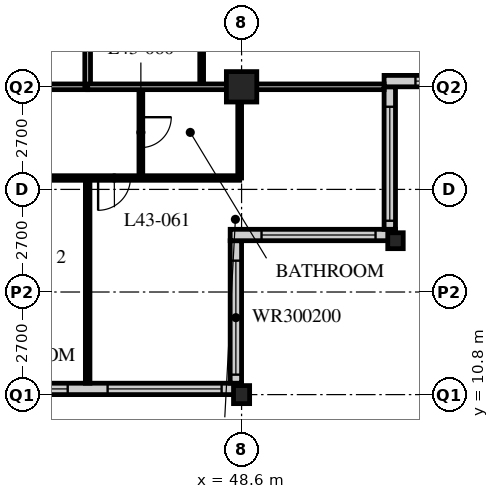
"""IFC4 building model, lengths in metres.
Left out: names, types, materials, properties, quantities, classifications, styles, units other than length and angle.
Written with IfcOpenShell. Run it as: python <this file> out.ifc"""

import sys

from ifc_helpers import new_model, si_unit, direction, frame, frame_2d, origin, origin_2d, place, context, subcontext, project, spatial, rectangle, hollow_rectangle, i_section, extrude, element, fill, save


model = new_model("IFC4")
c1 = context("Model", 3, precision=1e-05, world=origin(), true_north=direction((0.0, 1.0)))
c2 = subcontext(c1, "Body", "Model", "MODEL_VIEW")
j1 = project(units=[si_unit("LENGTHUNIT", "METRE"), si_unit("PLANEANGLEUNIT", "RADIAN")], contexts=[c1])
p1 = place(None, origin())
s1 = spatial("IfcSite", under=j1, at=p1, CompositionType="ELEMENT")
p2 = place(p1, origin())
s2 = spatial("IfcBuilding", under=s1, at=p2, CompositionType="ELEMENT")
p3 = place(p2, frame((0.0, 0.0, 170.4)))
s3 = spatial("IfcBuildingStorey", under=s2, at=p3, CompositionType="ELEMENT", Elevation=170.4)
p4 = place(p3, frame((48.6, 10.8, 0.0), z_axis=(0.0, 0.0, 1.0), x_axis=(1.0, 0.0, 0.0)))
e1 = element("IfcColumn", 1, at=p4, inside=s3, PredefinedType="COLUMN", context=c2, shape_type="SweptSolid", body=[
    extrude(i_section(OverallWidth=0.424, OverallDepth=0.475, WebThickness=0.048, FlangeThickness=0.077, FilletRadius=0.015, at=origin_2d()), origin(), (0.0, 0.0, 1.0), 3.6),
])
p5 = place(p3, frame((48.6, 18.9, 0.0), z_axis=(0.0, 0.0, 1.0), x_axis=(1.0, 0.0, 0.0)))
e2 = element("IfcColumn", 2, at=p5, inside=s3, PredefinedType="COLUMN", context=c2, shape_type="SweptSolid", body=[
    extrude(hollow_rectangle(XDim=0.8, YDim=0.8, WallThickness=0.08, at=origin_2d()), origin(), (0.0, 0.0, 1.0), 3.6),
])
p6 = place(p3, frame((52.65, 14.85, 0.0), z_axis=(0.0, 0.0, 1.0), x_axis=(1.0, 0.0, 0.0)))
e3 = element("IfcColumn", 3, at=p6, inside=s3, PredefinedType="COLUMN", context=c2, shape_type="SweptSolid", body=[
    extrude(i_section(OverallWidth=0.407, OverallDepth=0.419, WebThickness=0.031, FlangeThickness=0.049, FilletRadius=0.015, at=origin_2d()), origin(), (0.0, 0.0, 1.0), 3.6),
])
p7 = place(p3, frame((8.4, 10.95, 0.0), z_axis=(0.0, 0.0, 1.0), x_axis=(1.0, 0.0, 0.0)))
e4 = element("IfcWall", 4, at=p7, inside=s3, PredefinedType="SOLIDWALL", context=c2, shape_type="SweptSolid", body=[
    extrude(rectangle(XDim=40.2, YDim=0.3, at=frame_2d((20.1, 0.0))), origin(), (0.0, 0.0, 1.0), 3.39),
])
p8 = place(p7, frame((0.225, 0.0, 0.6)))
e5 = element("IfcOpeningElement", 5, at=p8, cuts=e4, PredefinedType="OPENING", context=c2, shape_type="SweptSolid", body=[
    extrude(rectangle(XDim=3.0, YDim=2.4, at=frame_2d((1.5, 1.2))), frame((0.0, 0.16, 0.0), z_axis=(0.0, -1.0, 0.0), x_axis=(1.0, 0.0, 0.0)), (0.0, 0.0, 1.0), 0.32),
])
p9 = place(p7, frame((4.275, 0.0, 0.6)))
e6 = element("IfcOpeningElement", 6, at=p9, cuts=e4, PredefinedType="OPENING", context=c2, shape_type="SweptSolid", body=[
    extrude(rectangle(XDim=3.0, YDim=2.4, at=frame_2d((1.5, 1.2))), frame((0.0, 0.16, 0.0), z_axis=(0.0, -1.0, 0.0), x_axis=(1.0, 0.0, 0.0)), (0.0, 0.0, 1.0), 0.32),
])
p10 = place(p7, frame((8.325, 0.0, 0.6)))
e7 = element("IfcOpeningElement", 7, at=p10, cuts=e4, PredefinedType="OPENING", context=c2, shape_type="SweptSolid", body=[
    extrude(rectangle(XDim=3.0, YDim=2.4, at=frame_2d((1.5, 1.2))), frame((0.0, 0.16, 0.0), z_axis=(0.0, -1.0, 0.0), x_axis=(1.0, 0.0, 0.0)), (0.0, 0.0, 1.0), 0.32),
])
p11 = place(p7, frame((12.375, 0.0, 0.6)))
e8 = element("IfcOpeningElement", 8, at=p11, cuts=e4, PredefinedType="OPENING", context=c2, shape_type="SweptSolid", body=[
    extrude(rectangle(XDim=3.0, YDim=2.4, at=frame_2d((1.5, 1.2))), frame((0.0, 0.16, 0.0), z_axis=(0.0, -1.0, 0.0), x_axis=(1.0, 0.0, 0.0)), (0.0, 0.0, 1.0), 0.32),
])
p12 = place(p7, frame((16.425, 0.0, 0.6)))
e9 = element("IfcOpeningElement", 9, at=p12, cuts=e4, PredefinedType="OPENING", context=c2, shape_type="SweptSolid", body=[
    extrude(rectangle(XDim=3.0, YDim=2.4, at=frame_2d((1.5, 1.2))), frame((0.0, 0.16, 0.0), z_axis=(0.0, -1.0, 0.0), x_axis=(1.0, 0.0, 0.0)), (0.0, 0.0, 1.0), 0.32),
])
p13 = place(p7, frame((20.475, 0.0, 0.6)))
e10 = element("IfcOpeningElement", 10, at=p13, cuts=e4, PredefinedType="OPENING", context=c2, shape_type="SweptSolid", body=[
    extrude(rectangle(XDim=3.0, YDim=2.4, at=frame_2d((1.5, 1.2))), frame((0.0, 0.16, 0.0), z_axis=(0.0, -1.0, 0.0), x_axis=(1.0, 0.0, 0.0)), (0.0, 0.0, 1.0), 0.32),
])
p14 = place(p7, frame((24.525, 0.0, 0.6)))
e11 = element("IfcOpeningElement", 11, at=p14, cuts=e4, PredefinedType="OPENING", context=c2, shape_type="SweptSolid", body=[
    extrude(rectangle(XDim=3.0, YDim=2.4, at=frame_2d((1.5, 1.2))), frame((0.0, 0.16, 0.0), z_axis=(0.0, -1.0, 0.0), x_axis=(1.0, 0.0, 0.0)), (0.0, 0.0, 1.0), 0.32),
])
p15 = place(p7, frame((28.575, 0.0, 0.6)))
e12 = element("IfcOpeningElement", 12, at=p15, cuts=e4, PredefinedType="OPENING", context=c2, shape_type="SweptSolid", body=[
    extrude(rectangle(XDim=3.0, YDim=2.4, at=frame_2d((1.5, 1.2))), frame((0.0, 0.16, 0.0), z_axis=(0.0, -1.0, 0.0), x_axis=(1.0, 0.0, 0.0)), (0.0, 0.0, 1.0), 0.32),
])
p16 = place(p7, frame((32.625, 0.0, 0.6)))
e13 = element("IfcOpeningElement", 13, at=p16, cuts=e4, PredefinedType="OPENING", context=c2, shape_type="SweptSolid", body=[
    extrude(rectangle(XDim=3.0, YDim=2.4, at=frame_2d((1.5, 1.2))), frame((0.0, 0.16, 0.0), z_axis=(0.0, -1.0, 0.0), x_axis=(1.0, 0.0, 0.0)), (0.0, 0.0, 1.0), 0.32),
])
p17 = place(p7, frame((36.675, 0.0, 0.6)))
e14 = element("IfcOpeningElement", 14, at=p17, cuts=e4, PredefinedType="OPENING", context=c2, shape_type="SweptSolid", body=[
    extrude(rectangle(XDim=3.0, YDim=2.4, at=frame_2d((1.5, 1.2))), frame((0.0, 0.16, 0.0), z_axis=(0.0, -1.0, 0.0), x_axis=(1.0, 0.0, 0.0)), (0.0, 0.0, 1.0), 0.32),
])
p18 = place(p3, frame((48.45, 11.1, 0.0), z_axis=(0.0, 0.0, 1.0), x_axis=(0.0, 1.0, 0.0)))
e15 = element("IfcWall", 15, at=p18, inside=s3, PredefinedType="SOLIDWALL", context=c2, shape_type="SweptSolid", body=[
    extrude(rectangle(XDim=3.75, YDim=0.3, at=frame_2d((1.875, 0.0))), origin(), (0.0, 0.0, 1.0), 3.39),
])
p19 = place(p18, frame((0.225, 0.0, 0.6)))
e16 = element("IfcOpeningElement", 16, at=p19, cuts=e15, PredefinedType="OPENING", context=c2, shape_type="SweptSolid", body=[
    extrude(rectangle(XDim=3.0, YDim=2.0, at=frame_2d((1.5, 1.0))), frame((0.0, 0.16, 0.0), z_axis=(0.0, -1.0, 0.0), x_axis=(1.0, 0.0, 0.0)), (0.0, 0.0, 1.0), 0.32),
])
p20 = place(p3, frame((48.3, 15.0, 0.0), z_axis=(0.0, 0.0, 1.0), x_axis=(1.0, 0.0, 0.0)))
e17 = element("IfcWall", 17, at=p20, inside=s3, PredefinedType="SOLIDWALL", context=c2, shape_type="SweptSolid", body=[
    extrude(rectangle(XDim=4.35, YDim=0.3, at=frame_2d((2.175, 0.0))), origin(), (0.0, 0.0, 1.0), 3.39),
])
p21 = place(p20, frame((0.825, 0.0, 0.6)))
e18 = element("IfcOpeningElement", 18, at=p21, cuts=e17, PredefinedType="OPENING", context=c2, shape_type="SweptSolid", body=[
    extrude(rectangle(XDim=3.0, YDim=2.0, at=frame_2d((1.5, 1.0))), frame((0.0, 0.16, 0.0), z_axis=(0.0, -1.0, 0.0), x_axis=(1.0, 0.0, 0.0)), (0.0, 0.0, 1.0), 0.32),
])
p22 = place(p3, frame((52.5, 15.15, 0.0), z_axis=(0.0, 0.0, 1.0), x_axis=(0.0, 1.0, 0.0)))
e19 = element("IfcWall", 19, at=p22, inside=s3, PredefinedType="SOLIDWALL", context=c2, shape_type="SweptSolid", body=[
    extrude(rectangle(XDim=3.75, YDim=0.3, at=frame_2d((1.875, 0.0))), origin(), (0.0, 0.0, 1.0), 3.39),
])
p23 = place(p22, frame((0.225, 0.0, 0.6)))
e20 = element("IfcOpeningElement", 20, at=p23, cuts=e19, PredefinedType="OPENING", context=c2, shape_type="SweptSolid", body=[
    extrude(rectangle(XDim=3.0, YDim=2.0, at=frame_2d((1.5, 1.0))), frame((0.0, 0.16, 0.0), z_axis=(0.0, -1.0, 0.0), x_axis=(1.0, 0.0, 0.0)), (0.0, 0.0, 1.0), 0.32),
])
p24 = place(p3, frame((52.35, 19.05, 0.0), z_axis=(0.0, 0.0, 1.0), x_axis=(1.0, 0.0, 0.0)))
e21 = element("IfcWall", 21, at=p24, inside=s3, PredefinedType="SOLIDWALL", context=c2, shape_type="SweptSolid", body=[
    extrude(rectangle(XDim=4.35, YDim=0.3, at=frame_2d((2.175, 0.0))), origin(), (0.0, 0.0, 1.0), 3.39),
])
p25 = place(p24, frame((0.825, 0.0, 0.6)))
e22 = element("IfcOpeningElement", 22, at=p25, cuts=e21, PredefinedType="OPENING", context=c2, shape_type="SweptSolid", body=[
    extrude(rectangle(XDim=3.0, YDim=2.0, at=frame_2d((1.5, 1.0))), frame((0.0, 0.16, 0.0), z_axis=(0.0, -1.0, 0.0), x_axis=(1.0, 0.0, 0.0)), (0.0, 0.0, 1.0), 0.32),
])
p26 = place(p3, frame((12.15, 18.9, 0.0), z_axis=(0.0, 0.0, 1.0), x_axis=(1.0, 0.0, 0.0)))
e23 = element("IfcWall", 23, at=p26, inside=s3, PredefinedType="PARTITIONING", context=c2, shape_type="SweptSolid", body=[
    extrude(rectangle(XDim=32.4, YDim=0.15, at=frame_2d((16.2, 0.0))), origin(), (0.0, 0.0, 1.0), 2.778),
])
p27 = place(p26, frame((6.4, 0.0, 0.0)))
e24 = element("IfcOpeningElement", 24, at=p27, cuts=e23, PredefinedType="OPENING", context=c2, shape_type="SweptSolid", body=[
    extrude(rectangle(XDim=1.0, YDim=2.1, at=frame_2d((0.5, 1.05))), frame((0.0, 0.085, 0.0), z_axis=(0.0, -1.0, 0.0), x_axis=(1.0, 0.0, 0.0)), (0.0, 0.0, 1.0), 0.17),
])
p28 = place(p26, frame((8.8, 0.0, 0.0)))
e25 = element("IfcOpeningElement", 25, at=p28, cuts=e23, PredefinedType="OPENING", context=c2, shape_type="SweptSolid", body=[
    extrude(rectangle(XDim=1.0, YDim=2.1, at=frame_2d((0.5, 1.05))), frame((0.0, 0.085, 0.0), z_axis=(0.0, -1.0, 0.0), x_axis=(1.0, 0.0, 0.0)), (0.0, 0.0, 1.0), 0.17),
])
p29 = place(p26, frame((13.05, 0.0, 0.0)))
e26 = element("IfcOpeningElement", 26, at=p29, cuts=e23, PredefinedType="OPENING", context=c2, shape_type="SweptSolid", body=[
    extrude(rectangle(XDim=1.0, YDim=2.1, at=frame_2d((0.5, 1.05))), frame((0.0, 0.085, 0.0), z_axis=(0.0, -1.0, 0.0), x_axis=(1.0, 0.0, 0.0)), (0.0, 0.0, 1.0), 0.17),
])
p30 = place(p26, frame((22.6, 0.0, 0.0)))
e27 = element("IfcOpeningElement", 27, at=p30, cuts=e23, PredefinedType="OPENING", context=c2, shape_type="SweptSolid", body=[
    extrude(rectangle(XDim=1.0, YDim=2.1, at=frame_2d((0.5, 1.05))), frame((0.0, 0.085, 0.0), z_axis=(0.0, -1.0, 0.0), x_axis=(1.0, 0.0, 0.0)), (0.0, 0.0, 1.0), 0.17),
])
p31 = place(p26, frame((25.0, 0.0, 0.0)))
e28 = element("IfcOpeningElement", 28, at=p31, cuts=e23, PredefinedType="OPENING", context=c2, shape_type="SweptSolid", body=[
    extrude(rectangle(XDim=1.0, YDim=2.1, at=frame_2d((0.5, 1.05))), frame((0.0, 0.085, 0.0), z_axis=(0.0, -1.0, 0.0), x_axis=(1.0, 0.0, 0.0)), (0.0, 0.0, 1.0), 0.17),
])
p32 = place(p26, frame((1.525, 0.0, 0.0)))
e29 = element("IfcOpeningElement", 29, at=p32, cuts=e23, PredefinedType="OPENING", context=c2, shape_type="SweptSolid", body=[
    extrude(rectangle(XDim=1.0, YDim=2.1, at=frame_2d((0.5, 1.05))), frame((0.0, 0.085, 0.0), z_axis=(0.0, -1.0, 0.0), x_axis=(1.0, 0.0, 0.0)), (0.0, 0.0, 1.0), 0.17),
])
p33 = place(p26, frame((29.875, 0.0, 0.0)))
e30 = element("IfcOpeningElement", 30, at=p33, cuts=e23, PredefinedType="OPENING", context=c2, shape_type="SweptSolid", body=[
    extrude(rectangle(XDim=1.0, YDim=2.1, at=frame_2d((0.5, 1.05))), frame((0.0, 0.085, 0.0), z_axis=(0.0, -1.0, 0.0), x_axis=(1.0, 0.0, 0.0)), (0.0, 0.0, 1.0), 0.17),
])
p34 = place(p3, frame((44.55, 18.9, 0.0), z_axis=(0.0, 0.0, 1.0), x_axis=(0.0, 1.0, 0.0)))
e31 = element("IfcWall", 31, at=p34, inside=s3, PredefinedType="PARTITIONING", context=c2, shape_type="SweptSolid", body=[
    extrude(rectangle(XDim=24.3, YDim=0.15, at=frame_2d((12.15, 0.0))), origin(), (0.0, 0.0, 1.0), 3.39),
])
p35 = place(p34, frame((2.35, 0.0, 0.0)))
e32 = element("IfcOpeningElement", 32, at=p35, cuts=e31, PredefinedType="OPENING", context=c2, shape_type="SweptSolid", body=[
    extrude(rectangle(XDim=1.0, YDim=2.1, at=frame_2d((0.5, 1.05))), frame((0.0, 0.085, 0.0), z_axis=(0.0, -1.0, 0.0), x_axis=(1.0, 0.0, 0.0)), (0.0, 0.0, 1.0), 0.17),
])
p36 = place(p34, frame((4.45, 0.0, 0.0)))
e33 = element("IfcOpeningElement", 33, at=p36, cuts=e31, PredefinedType="OPENING", context=c2, shape_type="SweptSolid", body=[
    extrude(rectangle(XDim=1.0, YDim=2.1, at=frame_2d((0.5, 1.05))), frame((0.0, 0.085, 0.0), z_axis=(0.0, -1.0, 0.0), x_axis=(1.0, 0.0, 0.0)), (0.0, 0.0, 1.0), 0.17),
])
p37 = place(p34, frame((18.55, 0.0, 0.0)))
e34 = element("IfcOpeningElement", 34, at=p37, cuts=e31, PredefinedType="OPENING", context=c2, shape_type="SweptSolid", body=[
    extrude(rectangle(XDim=1.0, YDim=2.1, at=frame_2d((0.5, 1.05))), frame((0.0, 0.085, 0.0), z_axis=(0.0, -1.0, 0.0), x_axis=(1.0, 0.0, 0.0)), (0.0, 0.0, 1.0), 0.17),
])
p38 = place(p34, frame((22.6, 0.0, 0.0)))
e35 = element("IfcOpeningElement", 35, at=p38, cuts=e31, PredefinedType="OPENING", context=c2, shape_type="SweptSolid", body=[
    extrude(rectangle(XDim=1.0, YDim=2.1, at=frame_2d((0.5, 1.05))), frame((0.0, 0.085, 0.0), z_axis=(0.0, -1.0, 0.0), x_axis=(1.0, 0.0, 0.0)), (0.0, 0.0, 1.0), 0.17),
])
p39 = place(p3, frame((47.55, 18.9, 0.0), z_axis=(0.0, 0.0, 1.0), x_axis=(0.0, 1.0, 0.0)))
e36 = element("IfcWall", 36, at=p39, inside=s3, PredefinedType="PARTITIONING", context=c2, shape_type="SweptSolid", body=[
    extrude(rectangle(XDim=2.2, YDim=0.1, at=frame_2d((1.1, 0.0))), origin(), (0.0, 0.0, 1.0), 3.39),
])
p40 = place(p3, frame((40.5, 16.5, 0.0), z_axis=(0.0, 0.0, 1.0), x_axis=(1.0, 0.0, 0.0)))
e37 = element("IfcWall", 37, at=p40, inside=s3, PredefinedType="PARTITIONING", context=c2, shape_type="SweptSolid", body=[
    extrude(rectangle(XDim=8.05, YDim=0.12, at=frame_2d((4.025, 0.0))), origin(), (0.0, 0.0, 1.0), 3.39),
])
p41 = place(p40, frame((0.475, 0.0, 0.0)))
e38 = element("IfcOpeningElement", 38, at=p41, cuts=e37, PredefinedType="OPENING", context=c2, shape_type="SweptSolid", body=[
    extrude(rectangle(XDim=0.85, YDim=2.1, at=frame_2d((0.425, 1.05))), frame((0.0, 0.07, 0.0), z_axis=(0.0, -1.0, 0.0), x_axis=(1.0, 0.0, 0.0)), (0.0, 0.0, 1.0), 0.14),
])
p42 = place(p40, frame((4.325, 0.0, 0.0)))
e39 = element("IfcOpeningElement", 39, at=p42, cuts=e37, PredefinedType="OPENING", context=c2, shape_type="SweptSolid", body=[
    extrude(rectangle(XDim=0.85, YDim=2.1, at=frame_2d((0.425, 1.05))), frame((0.0, 0.07, 0.0), z_axis=(0.0, -1.0, 0.0), x_axis=(1.0, 0.0, 0.0)), (0.0, 0.0, 1.0), 0.14),
])
p43 = place(p3, frame((45.95, 18.9, 0.0), z_axis=(0.0, 0.0, 1.0), x_axis=(0.0, -1.0, 0.0)))
e40 = element("IfcWall", 40, at=p43, inside=s3, PredefinedType="PARTITIONING", context=c2, shape_type="SweptSolid", body=[
    extrude(rectangle(XDim=2.4, YDim=0.1, at=frame_2d((1.2, 0.0))), origin(), (0.0, 0.0, 1.0), 3.39),
])
p44 = place(p43, frame((0.8, 0.0, 0.0)))
e41 = element("IfcOpeningElement", 41, at=p44, cuts=e40, PredefinedType="OPENING", context=c2, shape_type="SweptSolid", body=[
    extrude(rectangle(XDim=0.8, YDim=2.1, at=frame_2d((0.4, 1.05))), frame((0.0, 0.06, 0.0), z_axis=(0.0, -1.0, 0.0), x_axis=(1.0, 0.0, 0.0)), (0.0, 0.0, 1.0), 0.12),
])
p45 = place(p3, frame((48.55, 18.9, 0.0), z_axis=(0.0, 0.0, 1.0), x_axis=(0.0, -1.0, 0.0)))
e42 = element("IfcWall", 42, at=p45, inside=s3, PredefinedType="PARTITIONING", context=c2, shape_type="SweptSolid", body=[
    extrude(rectangle(XDim=2.4, YDim=0.1, at=frame_2d((1.2, 0.0))), origin(), (0.0, 0.0, 1.0), 2.778),
])
p46 = place(p3, frame((44.55, 16.5, 0.0), z_axis=(0.0, 0.0, 1.0), x_axis=(0.0, -1.0, 0.0)))
e43 = element("IfcWall", 43, at=p46, inside=s3, PredefinedType="PARTITIONING", context=c2, shape_type="SweptSolid", body=[
    extrude(rectangle(XDim=5.4, YDim=0.12, at=frame_2d((2.7, 0.0))), origin(), (0.0, 0.0, 1.0), 3.39),
])
p47 = place(p3, frame((44.55, 18.9, 0.0), z_axis=(0.0, 0.0, 1.0), x_axis=(1.0, 0.0, 0.0)))
e44 = element("IfcWall", 44, at=p47, inside=s3, PredefinedType="PARTITIONING", context=c2, shape_type="SweptSolid", body=[
    extrude(rectangle(XDim=7.8, YDim=0.15, at=frame_2d((3.9, 0.0))), origin(), (0.0, 0.0, 1.0), 2.778),
])
p48 = place(p16, origin())
e45 = element("IfcWindow", 45, at=p48, inside=s3, PartitioningType="SINGLE_PANEL", PredefinedType="WINDOW", context=c2, shape_type="SweptSolid", body=[
    extrude(rectangle(XDim=3.0, YDim=2.4, at=frame_2d((1.5, 1.2))), frame((0.0, 0.03, 0.0), z_axis=(0.0, -1.0, 0.0), x_axis=(1.0, 0.0, 0.0)), (0.0, 0.0, 1.0), 0.06),
])
fill(e13, e45)
p49 = place(p17, origin())
e46 = element("IfcWindow", 46, at=p49, inside=s3, PartitioningType="SINGLE_PANEL", PredefinedType="WINDOW", context=c2, shape_type="SweptSolid", body=[
    extrude(rectangle(XDim=3.0, YDim=2.4, at=frame_2d((1.5, 1.2))), frame((0.0, 0.03, 0.0), z_axis=(0.0, -1.0, 0.0), x_axis=(1.0, 0.0, 0.0)), (0.0, 0.0, 1.0), 0.06),
])
fill(e14, e46)
p50 = place(p19, origin())
e47 = element("IfcWindow", 47, at=p50, inside=s3, PartitioningType="SINGLE_PANEL", PredefinedType="WINDOW", context=c2, shape_type="SweptSolid", body=[
    extrude(rectangle(XDim=3.0, YDim=2.0, at=frame_2d((1.5, 1.0))), frame((0.0, 0.03, 0.0), z_axis=(0.0, -1.0, 0.0), x_axis=(1.0, 0.0, 0.0)), (0.0, 0.0, 1.0), 0.06),
])
fill(e16, e47)
p51 = place(p21, origin())
e48 = element("IfcWindow", 48, at=p51, inside=s3, PartitioningType="SINGLE_PANEL", PredefinedType="WINDOW", context=c2, shape_type="SweptSolid", body=[
    extrude(rectangle(XDim=3.0, YDim=2.0, at=frame_2d((1.5, 1.0))), frame((0.0, 0.03, 0.0), z_axis=(0.0, -1.0, 0.0), x_axis=(1.0, 0.0, 0.0)), (0.0, 0.0, 1.0), 0.06),
])
fill(e18, e48)
p52 = place(p23, origin())
e49 = element("IfcWindow", 49, at=p52, inside=s3, PartitioningType="SINGLE_PANEL", PredefinedType="WINDOW", context=c2, shape_type="SweptSolid", body=[
    extrude(rectangle(XDim=3.0, YDim=2.0, at=frame_2d((1.5, 1.0))), frame((0.0, 0.03, 0.0), z_axis=(0.0, -1.0, 0.0), x_axis=(1.0, 0.0, 0.0)), (0.0, 0.0, 1.0), 0.06),
])
fill(e20, e49)
p53 = place(p25, origin())
e50 = element("IfcWindow", 50, at=p53, inside=s3, PartitioningType="SINGLE_PANEL", PredefinedType="WINDOW", context=c2, shape_type="SweptSolid", body=[
    extrude(rectangle(XDim=3.0, YDim=2.0, at=frame_2d((1.5, 1.0))), frame((0.0, 0.03, 0.0), z_axis=(0.0, -1.0, 0.0), x_axis=(1.0, 0.0, 0.0)), (0.0, 0.0, 1.0), 0.06),
])
fill(e22, e50)
p54 = place(p44, origin())
e51 = element("IfcDoor", 51, at=p54, inside=s3, OperationType="SINGLE_SWING_LEFT", PredefinedType="DOOR", context=c2, shape_type="SweptSolid", body=[
    extrude(rectangle(XDim=0.8, YDim=2.1, at=frame_2d((0.4, 1.05))), frame((0.0, 0.025, 0.0), z_axis=(0.0, -1.0, 0.0), x_axis=(1.0, 0.0, 0.0)), (0.0, 0.0, 1.0), 0.05),
])
fill(e41, e51)
p55 = place(p42, origin())
e52 = element("IfcDoor", 52, at=p55, inside=s3, OperationType="SINGLE_SWING_RIGHT", PredefinedType="DOOR", context=c2, shape_type="SweptSolid", body=[
    extrude(rectangle(XDim=0.85, YDim=2.1, at=frame_2d((0.425, 1.05))), frame((0.0, 0.025, 0.0), z_axis=(0.0, -1.0, 0.0), x_axis=(1.0, 0.0, 0.0)), (0.0, 0.0, 1.0), 0.05),
])
fill(e39, e52)
save(model, sys.argv[1])
